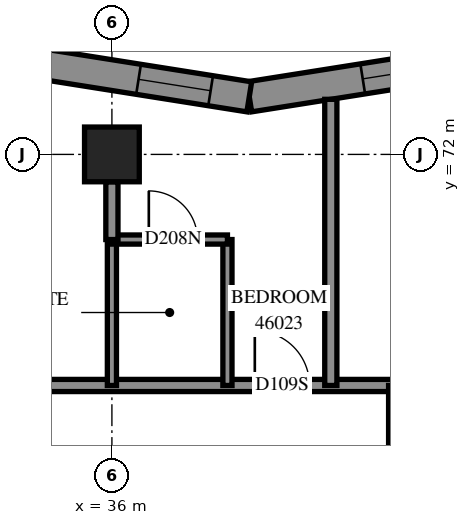
"""IFC4 building model, lengths in metres.
Left out: names, types, materials, properties, quantities, classifications, styles, units other than length and angle.
Written with IfcOpenShell. Run it as: python <this file> out.ifc"""

import sys

from ifc_helpers import new_model, si_unit, direction, frame, frame_2d, origin, origin_2d, place, context, subcontext, project, spatial, polyline, rectangle, outline, extrude, element, fill, save


model = new_model("IFC4")
c1 = context("Model", 3, precision=1e-05, world=origin(), true_north=direction((0.0, 1.0)))
c2 = subcontext(c1, "Body", "Model", "MODEL_VIEW")
j1 = project(units=[si_unit("LENGTHUNIT", "METRE"), si_unit("PLANEANGLEUNIT", "RADIAN")], contexts=[c1])
p1 = place(None, origin())
s1 = spatial("IfcSite", under=j1, at=p1, CompositionType="ELEMENT")
p2 = place(p1, origin())
s2 = spatial("IfcBuilding", under=s1, at=p2, CompositionType="ELEMENT")
p3 = place(p2, frame((0.0, 0.0, 169.4)))
s3 = spatial("IfcBuildingStorey", under=s2, at=p3, CompositionType="ELEMENT", Elevation=169.4)
p4 = place(p3, frame((36.0, 72.0, 0.0), z_axis=(0.0, 0.0, 1.0), x_axis=(1.0, 0.0, 0.0)))
e1 = element("IfcColumn", 1, at=p4, inside=s3, PredefinedType="COLUMN", context=c2, shape_type="SweptSolid", body=[
    extrude(rectangle(XDim=0.9, YDim=0.9, at=origin_2d()), origin(), (0.0, 0.0, 1.0), 3.1),
])
p5 = place(p3, frame((42.071, 73.55, 0.0), z_axis=(0.0, 0.0, 1.0), x_axis=(-0.9877213372, -0.1562259905, 0.0)))
e2 = element("IfcWall", 2, at=p5, inside=s3, PredefinedType="SOLIDWALL", context=c2, shape_type="SweptSolid", body=[
    extrude(outline(polyline([(-0.04, -0.25), (3.82, -0.25), (3.899, 0.25), (0.04, 0.25), (-0.04, -0.25)])), origin(), (0.0, 0.0, 1.0), 3.1),
])
p6 = place(p5, frame((0.771, 0.0, 0.45)))
e3 = element("IfcOpeningElement", 3, at=p6, cuts=e2, PredefinedType="OPENING", context=c2, shape_type="SweptSolid", body=[
    extrude(rectangle(XDim=1.2, YDim=2.5, at=frame_2d((0.6, 1.25))), frame((0.0, 0.26, 0.0), z_axis=(0.0, -1.0, 0.0), x_axis=(1.0, 0.0, 0.0)), (0.0, 0.0, 1.0), 0.52),
])
p7 = place(p3, frame((38.259, 72.947, 0.0), z_axis=(0.0, 0.0, 1.0), x_axis=(-0.9877213372, 0.1562259905, 0.0)))
e4 = element("IfcWall", 4, at=p7, inside=s3, PredefinedType="SOLIDWALL", context=c2, shape_type="SweptSolid", body=[
    extrude(outline(polyline([(0.04, -0.25), (3.899, -0.25), (3.82, 0.25), (-0.04, 0.25), (0.04, -0.25)])), origin(), (0.0, 0.0, 1.0), 3.1),
])
p8 = place(p7, frame((0.643, 0.0, 0.45)))
e5 = element("IfcOpeningElement", 5, at=p8, cuts=e4, PredefinedType="OPENING", context=c2, shape_type="SweptSolid", body=[
    extrude(rectangle(XDim=1.2, YDim=2.5, at=frame_2d((0.6, 1.25))), frame((0.0, 0.26, 0.0), z_axis=(0.0, -1.0, 0.0), x_axis=(1.0, 0.0, 0.0)), (0.0, 0.0, 1.0), 0.52),
])
p9 = place(p3, frame((21.602, 68.2, 0.0), z_axis=(0.0, 0.0, 1.0), x_axis=(1.0, 0.0, 0.0)))
e6 = element("IfcWall", 6, at=p9, inside=s3, PredefinedType="PARTITIONING", context=c2, shape_type="SweptSolid", body=[
    extrude(rectangle(XDim=19.048, YDim=0.2, at=frame_2d((9.524, 0.0))), origin(), (0.0, 0.0, 1.0), 3.1),
])
p10 = place(p9, frame((3.998, 0.0, 0.0)))
e7 = element("IfcOpeningElement", 7, at=p10, cuts=e6, PredefinedType="OPENING", context=c2, shape_type="SweptSolid", body=[
    extrude(rectangle(XDim=0.9, YDim=2.1, at=frame_2d((0.45, 1.05))), frame((0.0, 0.11, 0.0), z_axis=(0.0, -1.0, 0.0), x_axis=(1.0, 0.0, 0.0)), (0.0, 0.0, 1.0), 0.22),
])
p11 = place(p9, frame((11.084, 0.0, 0.0)))
e8 = element("IfcOpeningElement", 8, at=p11, cuts=e6, PredefinedType="OPENING", context=c2, shape_type="SweptSolid", body=[
    extrude(rectangle(XDim=1.0, YDim=2.1, at=frame_2d((0.5, 1.05))), frame((0.0, 0.11, 0.0), z_axis=(0.0, -1.0, 0.0), x_axis=(1.0, 0.0, 0.0)), (0.0, 0.0, 1.0), 0.22),
])
p12 = place(p9, frame((16.748, 0.0, 0.0)))
e9 = element("IfcOpeningElement", 9, at=p12, cuts=e6, PredefinedType="OPENING", context=c2, shape_type="SweptSolid", body=[
    extrude(rectangle(XDim=0.9, YDim=2.1, at=frame_2d((0.45, 1.05))), frame((0.0, 0.11, 0.0), z_axis=(0.0, -1.0, 0.0), x_axis=(1.0, 0.0, 0.0)), (0.0, 0.0, 1.0), 0.22),
])
p13 = place(p3, frame((40.65, 63.452, 0.0), z_axis=(0.0, 0.0, 1.0), x_axis=(0.0, 1.0, 0.0)))
e10 = element("IfcWall", 10, at=p13, inside=s3, PredefinedType="PARTITIONING", context=c2, shape_type="SweptSolid", body=[
    extrude(rectangle(XDim=4.748, YDim=0.2, at=frame_2d((2.374, 0.0))), origin(), (0.0, 0.0, 1.0), 3.1),
])
p14 = place(p3, frame((39.6, 68.2, 0.0), z_axis=(0.0, 0.0, 1.0), x_axis=(0.0, 1.0, 0.0)))
e11 = element("IfcWall", 11, at=p14, inside=s3, PredefinedType="PARTITIONING", context=c2, shape_type="SweptSolid", body=[
    extrude(rectangle(XDim=4.706, YDim=0.2, at=frame_2d((2.353, 0.0))), origin(), (0.0, 0.0, 1.0), 3.1),
])
for number, where, z_axis, x_axis in (
    (12, (37.9, 68.2, 0.0), (0.0, 0.0, 1.0), (0.0, 1.0, 0.0)),
    (13, (36.0, 68.2, 0.0), (0.0, 0.0, 1.0), (0.0, 1.0, 0.0)),
):
    element("IfcWall", number, at=place(p3, frame(where, z_axis=z_axis, x_axis=x_axis)), inside=s3, PredefinedType="PARTITIONING", context=c2, shape_type="SweptSolid", body=[
        extrude(rectangle(XDim=2.4, YDim=0.15, at=frame_2d((1.2, 0.0))), origin(), (0.0, 0.0, 1.0), 3.1),
    ])
p15 = place(p3, frame((36.0, 70.6, 0.0), z_axis=(0.0, 0.0, 1.0), x_axis=(1.0, 0.0, 0.0)))
e14 = element("IfcWall", 14, at=p15, inside=s3, PredefinedType="PARTITIONING", context=c2, shape_type="SweptSolid", body=[
    extrude(rectangle(XDim=1.9, YDim=0.15, at=frame_2d((0.95, 0.0))), origin(), (0.0, 0.0, 1.0), 3.1),
])
p16 = place(p15, frame((0.607, 0.0, 0.0)))
e15 = element("IfcOpeningElement", 15, at=p16, cuts=e14, PredefinedType="OPENING", context=c2, shape_type="SweptSolid", body=[
    extrude(rectangle(XDim=0.8, YDim=2.1, at=frame_2d((0.4, 1.05))), frame((0.0, 0.085, 0.0), z_axis=(0.0, -1.0, 0.0), x_axis=(1.0, 0.0, 0.0)), (0.0, 0.0, 1.0), 0.17),
])
p17 = place(p3, frame((36.0, 70.6, 0.0), z_axis=(0.0, 0.0, 1.0), x_axis=(0.0, 1.0, 0.0)))
e16 = element("IfcWall", 16, at=p17, inside=s3, PredefinedType="PARTITIONING", context=c2, shape_type="SweptSolid", body=[
    extrude(rectangle(XDim=0.95, YDim=0.2, at=frame_2d((0.475, 0.0))), origin(), (0.0, 0.0, 1.0), 3.1),
])
p18 = place(p6, origin())
e17 = element("IfcWindow", 17, at=p18, inside=s3, PartitioningType="SINGLE_PANEL", PredefinedType="WINDOW", context=c2, shape_type="SweptSolid", body=[
    extrude(rectangle(XDim=1.2, YDim=2.5, at=frame_2d((0.6, 1.25))), frame((0.0, 0.18, 0.0), z_axis=(0.0, -1.0, 0.0), x_axis=(1.0, 0.0, 0.0)), (0.0, 0.0, 1.0), 0.06),
])
fill(e3, e17)
p19 = place(p8, origin())
e18 = element("IfcWindow", 18, at=p19, inside=s3, PartitioningType="SINGLE_PANEL", PredefinedType="WINDOW", context=c2, shape_type="SweptSolid", body=[
    extrude(rectangle(XDim=1.2, YDim=2.5, at=frame_2d((0.6, 1.25))), frame((0.0, 0.18, 0.0), z_axis=(0.0, -1.0, 0.0), x_axis=(1.0, 0.0, 0.0)), (0.0, 0.0, 1.0), 0.06),
])
fill(e5, e18)
p20 = place(p12, origin())
e19 = element("IfcDoor", 19, at=p20, inside=s3, OperationType="SINGLE_SWING_RIGHT", PredefinedType="DOOR", context=c2, shape_type="SweptSolid", body=[
    extrude(rectangle(XDim=0.9, YDim=2.1, at=frame_2d((0.45, 1.05))), frame((0.0, 0.025, 0.0), z_axis=(0.0, -1.0, 0.0), x_axis=(1.0, 0.0, 0.0)), (0.0, 0.0, 1.0), 0.05),
])
fill(e9, e19)
p21 = place(p16, origin())
e20 = element("IfcDoor", 20, at=p21, inside=s3, OperationType="SINGLE_SWING_RIGHT", PredefinedType="DOOR", context=c2, shape_type="SweptSolid", body=[
    extrude(rectangle(XDim=0.8, YDim=2.1, at=frame_2d((0.4, 1.05))), frame((0.0, 0.025, 0.0), z_axis=(0.0, -1.0, 0.0), x_axis=(1.0, 0.0, 0.0)), (0.0, 0.0, 1.0), 0.05),
])
fill(e15, e20)
save(model, sys.argv[1])
